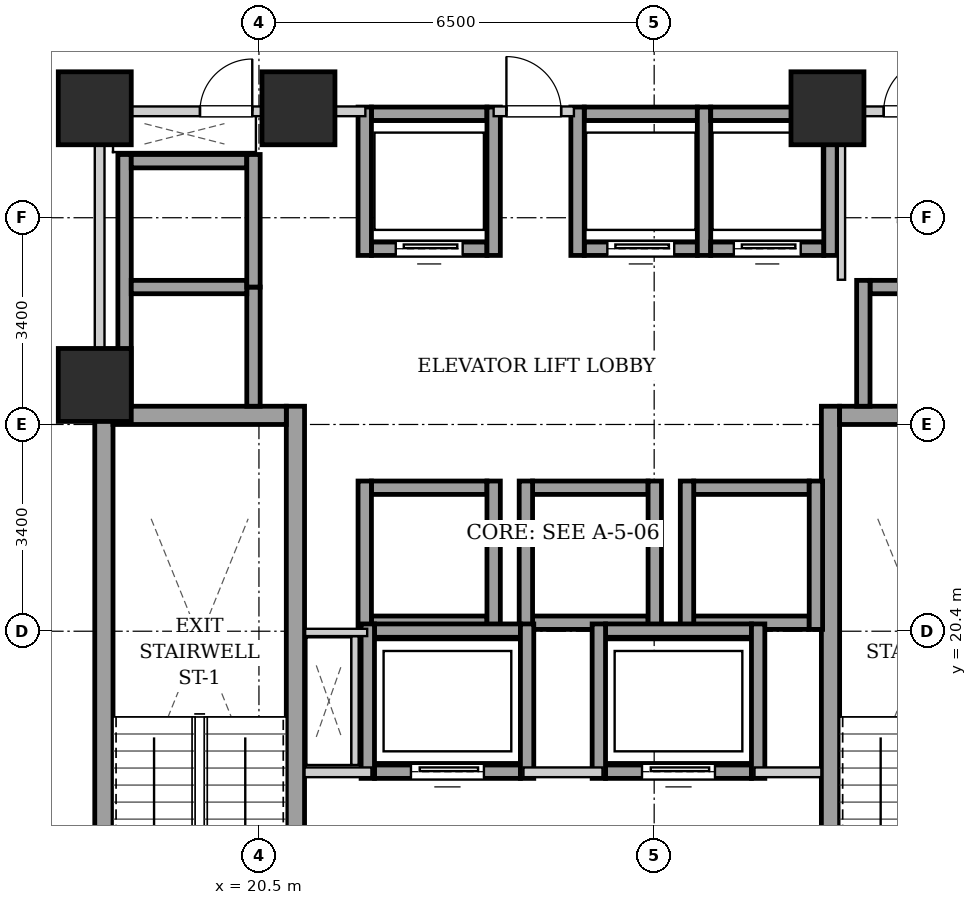
"""IFC4 building model, lengths in metres.
Left out: names, types, materials, properties, quantities, classifications, styles, units other than length and angle.
Written with IfcOpenShell. Run it as: python <this file> out.ifc"""

import sys

from ifc_helpers import new_model, si_unit, direction, frame, frame_2d, origin, origin_2d, place, context, subcontext, project, spatial, rectangle, extrude, element, fill, save


model = new_model("IFC4")
c1 = context("Model", 3, precision=1e-05, world=origin(), true_north=direction((0.0, 1.0)))
c2 = subcontext(c1, "Body", "Model", "MODEL_VIEW")
j1 = project(units=[si_unit("LENGTHUNIT", "METRE"), si_unit("PLANEANGLEUNIT", "RADIAN")], contexts=[c1])
p1 = place(None, origin())
s1 = spatial("IfcSite", under=j1, at=p1, CompositionType="ELEMENT")
p2 = place(p1, origin())
s2 = spatial("IfcBuilding", under=s1, at=p2, CompositionType="ELEMENT")
p3 = place(p2, frame((0.0, 0.0, 54.6)))
s3 = spatial("IfcBuildingStorey", under=s2, at=p3, CompositionType="ELEMENT", Elevation=54.6)
for number, where, z_axis, x_axis in (
    (1, (17.8, 29.0, 0.0), (0.0, 0.0, 1.0), (1.0, 0.0, 0.0)),
    (2, (21.15, 29.0, 0.0), (0.0, 0.0, 1.0), (1.0, 0.0, 0.0)),
    (3, (29.85, 29.0, 0.0), (0.0, 0.0, 1.0), (1.0, 0.0, 0.0)),
    (4, (17.8, 24.45, 0.0), (0.0, 0.0, 1.0), (1.0, 0.0, 0.0)),
):
    element("IfcColumn", number, at=place(p3, frame(where, z_axis=z_axis, x_axis=x_axis)), inside=s3, PredefinedType="COLUMN", context=c2, shape_type="SweptSolid", body=[
        extrude(rectangle(XDim=1.2, YDim=1.2, at=origin_2d()), origin(), (0.0, 0.0, 1.0), 3.2),
    ])
for number, where, z_axis, x_axis in (
    (5, (17.95, 15.1, 0.0), (0.0, 0.0, 1.0), (0.0, 1.0, 0.0)),
    (6, (21.1, 15.1, 0.0), (0.0, 0.0, 1.0), (0.0, 1.0, 0.0)),
):
    element("IfcWall", number, at=place(p3, frame(where, z_axis=z_axis, x_axis=x_axis)), inside=s3, PredefinedType="SHEAR", context=c2, shape_type="SweptSolid", body=[
        extrude(rectangle(XDim=9.0, YDim=0.3, at=frame_2d((4.5, 0.0))), origin(), (0.0, 0.0, 1.0), 2.94),
    ])
p4 = place(p3, frame((18.1, 23.95, 0.0), z_axis=(0.0, 0.0, 1.0), x_axis=(1.0, 0.0, 0.0)))
e7 = element("IfcWall", 7, at=p4, inside=s3, PredefinedType="SHEAR", context=c2, shape_type="SweptSolid", body=[
    extrude(rectangle(XDim=2.85, YDim=0.3, at=frame_2d((1.425, 0.0))), origin(), (0.0, 0.0, 1.0), 2.94),
])
p5 = place(p3, frame((29.9, 15.1, 0.0), z_axis=(0.0, 0.0, 1.0), x_axis=(0.0, 1.0, 0.0)))
e8 = element("IfcWall", 8, at=p5, inside=s3, PredefinedType="SHEAR", context=c2, shape_type="SweptSolid", body=[
    extrude(rectangle(XDim=9.0, YDim=0.3, at=frame_2d((4.5, 0.0))), origin(), (0.0, 0.0, 1.0), 2.94),
])
p6 = place(p3, frame((30.05, 23.95, 0.0), z_axis=(0.0, 0.0, 1.0), x_axis=(1.0, 0.0, 0.0)))
e9 = element("IfcWall", 9, at=p6, inside=s3, PredefinedType="SHEAR", context=c2, shape_type="SweptSolid", body=[
    extrude(rectangle(XDim=2.85, YDim=0.3, at=frame_2d((1.425, 0.0))), origin(), (0.0, 0.0, 1.0), 2.94),
])
p7 = place(p3, frame((22.35, 26.69, 0.0), z_axis=(0.0, 0.0, 1.0), x_axis=(1.0, 0.0, 0.0)))
e10 = element("IfcWall", 10, at=p7, inside=s3, PredefinedType="SHEAR", context=c2, shape_type="SweptSolid", body=[
    extrude(rectangle(XDim=1.9, YDim=0.22, at=frame_2d((0.95, 0.0))), origin(), (0.0, 0.0, 1.0), 2.94),
])
p8 = place(p7, frame((0.4, 0.0, 0.0)))
e11 = element("IfcOpeningElement", 11, at=p8, cuts=e10, PredefinedType="OPENING", context=c2, shape_type="SweptSolid", body=[
    extrude(rectangle(XDim=1.1, YDim=2.15, at=frame_2d((0.55, 1.075))), frame((0.0, 0.12, 0.0), z_axis=(0.0, -1.0, 0.0), x_axis=(1.0, 0.0, 0.0)), (0.0, 0.0, 1.0), 0.24),
])
p9 = place(p3, frame((22.35, 28.91, 0.0), z_axis=(0.0, 0.0, 1.0), x_axis=(1.0, 0.0, 0.0)))
e12 = element("IfcWall", 12, at=p9, inside=s3, PredefinedType="SHEAR", context=c2, shape_type="SweptSolid", body=[
    extrude(rectangle(XDim=1.9, YDim=0.22, at=frame_2d((0.95, 0.0))), origin(), (0.0, 0.0, 1.0), 2.94),
])
for number, where, z_axis, x_axis in (
    (13, (22.24, 26.58, 0.0), (0.0, 0.0, 1.0), (0.0, 1.0, 0.0)),
    (14, (24.36, 26.58, 0.0), (0.0, 0.0, 1.0), (0.0, 1.0, 0.0)),
):
    element("IfcWall", number, at=place(p3, frame(where, z_axis=z_axis, x_axis=x_axis)), inside=s3, PredefinedType="SHEAR", context=c2, shape_type="SweptSolid", body=[
        extrude(rectangle(XDim=2.44, YDim=0.22, at=frame_2d((1.22, 0.0))), origin(), (0.0, 0.0, 1.0), 2.94),
    ])
p10 = place(p3, frame((25.85, 26.69, 0.0), z_axis=(0.0, 0.0, 1.0), x_axis=(1.0, 0.0, 0.0)))
e15 = element("IfcWall", 15, at=p10, inside=s3, PredefinedType="SHEAR", context=c2, shape_type="SweptSolid", body=[
    extrude(rectangle(XDim=1.86, YDim=0.22, at=frame_2d((0.93, 0.0))), origin(), (0.0, 0.0, 1.0), 2.94),
])
p11 = place(p10, frame((0.38, 0.0, 0.0)))
e16 = element("IfcOpeningElement", 16, at=p11, cuts=e15, PredefinedType="OPENING", context=c2, shape_type="SweptSolid", body=[
    extrude(rectangle(XDim=1.1, YDim=2.15, at=frame_2d((0.55, 1.075))), frame((0.0, 0.12, 0.0), z_axis=(0.0, -1.0, 0.0), x_axis=(1.0, 0.0, 0.0)), (0.0, 0.0, 1.0), 0.24),
])
p12 = place(p3, frame((25.85, 28.91, 0.0), z_axis=(0.0, 0.0, 1.0), x_axis=(1.0, 0.0, 0.0)))
e17 = element("IfcWall", 17, at=p12, inside=s3, PredefinedType="SHEAR", context=c2, shape_type="SweptSolid", body=[
    extrude(rectangle(XDim=1.86, YDim=0.22, at=frame_2d((0.93, 0.0))), origin(), (0.0, 0.0, 1.0), 2.94),
])
for number, where, z_axis, x_axis in (
    (18, (25.74, 26.58, 0.0), (0.0, 0.0, 1.0), (0.0, 1.0, 0.0)),
    (19, (27.82, 26.58, 0.0), (0.0, 0.0, 1.0), (0.0, 1.0, 0.0)),
):
    element("IfcWall", number, at=place(p3, frame(where, z_axis=z_axis, x_axis=x_axis)), inside=s3, PredefinedType="SHEAR", context=c2, shape_type="SweptSolid", body=[
        extrude(rectangle(XDim=2.44, YDim=0.22, at=frame_2d((1.22, 0.0))), origin(), (0.0, 0.0, 1.0), 2.94),
    ])
p13 = place(p3, frame((27.93, 26.69, 0.0), z_axis=(0.0, 0.0, 1.0), x_axis=(1.0, 0.0, 0.0)))
e20 = element("IfcWall", 20, at=p13, inside=s3, PredefinedType="SHEAR", context=c2, shape_type="SweptSolid", body=[
    extrude(rectangle(XDim=1.86, YDim=0.22, at=frame_2d((0.93, 0.0))), origin(), (0.0, 0.0, 1.0), 2.94),
])
p14 = place(p13, frame((0.38, 0.0, 0.0)))
e21 = element("IfcOpeningElement", 21, at=p14, cuts=e20, PredefinedType="OPENING", context=c2, shape_type="SweptSolid", body=[
    extrude(rectangle(XDim=1.1, YDim=2.15, at=frame_2d((0.55, 1.075))), frame((0.0, 0.12, 0.0), z_axis=(0.0, -1.0, 0.0), x_axis=(1.0, 0.0, 0.0)), (0.0, 0.0, 1.0), 0.24),
])
p15 = place(p3, frame((27.93, 28.91, 0.0), z_axis=(0.0, 0.0, 1.0), x_axis=(1.0, 0.0, 0.0)))
e22 = element("IfcWall", 22, at=p15, inside=s3, PredefinedType="SHEAR", context=c2, shape_type="SweptSolid", body=[
    extrude(rectangle(XDim=1.86, YDim=0.22, at=frame_2d((0.93, 0.0))), origin(), (0.0, 0.0, 1.0), 2.94),
])
p16 = place(p3, frame((29.9, 26.58, 0.0), z_axis=(0.0, 0.0, 1.0), x_axis=(0.0, 1.0, 0.0)))
e23 = element("IfcWall", 23, at=p16, inside=s3, PredefinedType="SHEAR", context=c2, shape_type="SweptSolid", body=[
    extrude(rectangle(XDim=2.44, YDim=0.22, at=frame_2d((1.22, 0.0))), origin(), (0.0, 0.0, 1.0), 2.94),
])
for number, where, z_axis, x_axis in (
    (24, (22.35, 20.54, 0.0), (0.0, 0.0, 1.0), (1.0, 0.0, 0.0)),
    (25, (22.35, 22.76, 0.0), (0.0, 0.0, 1.0), (1.0, 0.0, 0.0)),
):
    element("IfcWall", number, at=place(p3, frame(where, z_axis=z_axis, x_axis=x_axis)), inside=s3, PredefinedType="SHEAR", context=c2, shape_type="SweptSolid", body=[
        extrude(rectangle(XDim=1.9, YDim=0.22, at=frame_2d((0.95, 0.0))), origin(), (0.0, 0.0, 1.0), 2.94),
    ])
for number, where, z_axis, x_axis in (
    (26, (22.24, 20.43, 0.0), (0.0, 0.0, 1.0), (0.0, 1.0, 0.0)),
    (27, (24.36, 20.43, 0.0), (0.0, 0.0, 1.0), (0.0, 1.0, 0.0)),
):
    element("IfcWall", number, at=place(p3, frame(where, z_axis=z_axis, x_axis=x_axis)), inside=s3, PredefinedType="SHEAR", context=c2, shape_type="SweptSolid", body=[
        extrude(rectangle(XDim=2.44, YDim=0.22, at=frame_2d((1.22, 0.0))), origin(), (0.0, 0.0, 1.0), 2.94),
    ])
for number, where, z_axis, x_axis in (
    (28, (25.0, 20.54, 0.0), (0.0, 0.0, 1.0), (1.0, 0.0, 0.0)),
    (29, (25.0, 22.76, 0.0), (0.0, 0.0, 1.0), (1.0, 0.0, 0.0)),
):
    element("IfcWall", number, at=place(p3, frame(where, z_axis=z_axis, x_axis=x_axis)), inside=s3, PredefinedType="SHEAR", context=c2, shape_type="SweptSolid", body=[
        extrude(rectangle(XDim=1.9, YDim=0.22, at=frame_2d((0.95, 0.0))), origin(), (0.0, 0.0, 1.0), 2.94),
    ])
for number, where, z_axis, x_axis in (
    (30, (24.89, 20.43, 0.0), (0.0, 0.0, 1.0), (0.0, 1.0, 0.0)),
    (31, (27.01, 20.43, 0.0), (0.0, 0.0, 1.0), (0.0, 1.0, 0.0)),
):
    element("IfcWall", number, at=place(p3, frame(where, z_axis=z_axis, x_axis=x_axis)), inside=s3, PredefinedType="SHEAR", context=c2, shape_type="SweptSolid", body=[
        extrude(rectangle(XDim=2.44, YDim=0.22, at=frame_2d((1.22, 0.0))), origin(), (0.0, 0.0, 1.0), 2.94),
    ])
for number, where, z_axis, x_axis in (
    (32, (27.65, 20.54, 0.0), (0.0, 0.0, 1.0), (1.0, 0.0, 0.0)),
    (33, (27.65, 22.76, 0.0), (0.0, 0.0, 1.0), (1.0, 0.0, 0.0)),
):
    element("IfcWall", number, at=place(p3, frame(where, z_axis=z_axis, x_axis=x_axis)), inside=s3, PredefinedType="SHEAR", context=c2, shape_type="SweptSolid", body=[
        extrude(rectangle(XDim=1.9, YDim=0.22, at=frame_2d((0.95, 0.0))), origin(), (0.0, 0.0, 1.0), 2.94),
    ])
for number, where, z_axis, x_axis in (
    (34, (27.54, 20.43, 0.0), (0.0, 0.0, 1.0), (0.0, 1.0, 0.0)),
    (35, (29.66, 20.43, 0.0), (0.0, 0.0, 1.0), (0.0, 1.0, 0.0)),
):
    element("IfcWall", number, at=place(p3, frame(where, z_axis=z_axis, x_axis=x_axis)), inside=s3, PredefinedType="SHEAR", context=c2, shape_type="SweptSolid", body=[
        extrude(rectangle(XDim=2.44, YDim=0.22, at=frame_2d((1.22, 0.0))), origin(), (0.0, 0.0, 1.0), 2.94),
    ])
p17 = place(p3, frame((18.29, 24.1, 0.0), z_axis=(0.0, 0.0, 1.0), x_axis=(0.0, 1.0, 0.0)))
e36 = element("IfcWall", 36, at=p17, inside=s3, PredefinedType="SHEAR", context=c2, shape_type="SweptSolid", body=[
    extrude(rectangle(XDim=4.14, YDim=0.22, at=frame_2d((2.07, 0.0))), origin(), (0.0, 0.0, 1.0), 2.94),
])
p18 = place(p3, frame((20.41, 24.1, 0.0), z_axis=(0.0, 0.0, 1.0), x_axis=(0.0, 1.0, 0.0)))
e37 = element("IfcWall", 37, at=p18, inside=s3, PredefinedType="SHEAR", context=c2, shape_type="SweptSolid", body=[
    extrude(rectangle(XDim=1.96, YDim=0.22, at=frame_2d((0.98, 0.0))), origin(), (0.0, 0.0, 1.0), 2.94),
])
for number, where, z_axis, x_axis in (
    (38, (18.4, 26.06, 0.0), (0.0, 0.0, 1.0), (1.0, 0.0, 0.0)),
    (39, (18.4, 28.13, 0.0), (0.0, 0.0, 1.0), (1.0, 0.0, 0.0)),
):
    element("IfcWall", number, at=place(p3, frame(where, z_axis=z_axis, x_axis=x_axis)), inside=s3, PredefinedType="SHEAR", context=c2, shape_type="SweptSolid", body=[
        extrude(rectangle(XDim=1.9, YDim=0.22, at=frame_2d((0.95, 0.0))), origin(), (0.0, 0.0, 1.0), 2.94),
    ])
p19 = place(p3, frame((20.41, 26.06, 0.0), z_axis=(0.0, 0.0, 1.0), x_axis=(0.0, 1.0, 0.0)))
e40 = element("IfcWall", 40, at=p19, inside=s3, PredefinedType="SHEAR", context=c2, shape_type="SweptSolid", body=[
    extrude(rectangle(XDim=2.18, YDim=0.22, at=frame_2d((1.09, 0.0))), origin(), (0.0, 0.0, 1.0), 2.94),
])
p20 = place(p3, frame((30.55, 26.06, 0.0), z_axis=(0.0, 0.0, 1.0), x_axis=(1.0, 0.0, 0.0)))
e41 = element("IfcWall", 41, at=p20, inside=s3, PredefinedType="SHEAR", context=c2, shape_type="SweptSolid", body=[
    extrude(rectangle(XDim=1.9, YDim=0.22, at=frame_2d((0.95, 0.0))), origin(), (0.0, 0.0, 1.0), 2.94),
])
p21 = place(p3, frame((30.44, 24.1, 0.0), z_axis=(0.0, 0.0, 1.0), x_axis=(0.0, 1.0, 0.0)))
e42 = element("IfcWall", 42, at=p21, inside=s3, PredefinedType="SHEAR", context=c2, shape_type="SweptSolid", body=[
    extrude(rectangle(XDim=2.07, YDim=0.22, at=frame_2d((1.035, 0.0))), origin(), (0.0, 0.0, 1.0), 2.94),
])
p22 = place(p3, frame((22.4, 18.09, 0.0), z_axis=(0.0, 0.0, 1.0), x_axis=(1.0, 0.0, 0.0)))
e43 = element("IfcWall", 43, at=p22, inside=s3, PredefinedType="SHEAR", context=c2, shape_type="SweptSolid", body=[
    extrude(rectangle(XDim=2.4, YDim=0.22, at=frame_2d((1.2, 0.0))), origin(), (0.0, 0.0, 1.0), 2.94),
])
p23 = place(p22, frame((0.6, 0.0, 0.0)))
e44 = element("IfcOpeningElement", 44, at=p23, cuts=e43, PredefinedType="OPENING", context=c2, shape_type="SweptSolid", body=[
    extrude(rectangle(XDim=1.2, YDim=2.15, at=frame_2d((0.6, 1.075))), frame((0.0, 0.12, 0.0), z_axis=(0.0, -1.0, 0.0), x_axis=(1.0, 0.0, 0.0)), (0.0, 0.0, 1.0), 0.24),
])
p24 = place(p3, frame((22.4, 20.41, 0.0), z_axis=(0.0, 0.0, 1.0), x_axis=(1.0, 0.0, 0.0)))
e45 = element("IfcWall", 45, at=p24, inside=s3, PredefinedType="SHEAR", context=c2, shape_type="SweptSolid", body=[
    extrude(rectangle(XDim=2.4, YDim=0.22, at=frame_2d((1.2, 0.0))), origin(), (0.0, 0.0, 1.0), 2.94),
])
for number, where, z_axis, x_axis in (
    (46, (22.29, 17.98, 0.0), (0.0, 0.0, 1.0), (0.0, 1.0, 0.0)),
    (47, (24.91, 17.98, 0.0), (0.0, 0.0, 1.0), (0.0, 1.0, 0.0)),
):
    element("IfcWall", number, at=place(p3, frame(where, z_axis=z_axis, x_axis=x_axis)), inside=s3, PredefinedType="SHEAR", context=c2, shape_type="SweptSolid", body=[
        extrude(rectangle(XDim=2.54, YDim=0.22, at=frame_2d((1.27, 0.0))), origin(), (0.0, 0.0, 1.0), 2.94),
    ])
p25 = place(p3, frame((26.2, 18.09, 0.0), z_axis=(0.0, 0.0, 1.0), x_axis=(1.0, 0.0, 0.0)))
e48 = element("IfcWall", 48, at=p25, inside=s3, PredefinedType="SHEAR", context=c2, shape_type="SweptSolid", body=[
    extrude(rectangle(XDim=2.4, YDim=0.22, at=frame_2d((1.2, 0.0))), origin(), (0.0, 0.0, 1.0), 2.94),
])
p26 = place(p25, frame((0.6, 0.0, 0.0)))
e49 = element("IfcOpeningElement", 49, at=p26, cuts=e48, PredefinedType="OPENING", context=c2, shape_type="SweptSolid", body=[
    extrude(rectangle(XDim=1.2, YDim=2.15, at=frame_2d((0.6, 1.075))), frame((0.0, 0.12, 0.0), z_axis=(0.0, -1.0, 0.0), x_axis=(1.0, 0.0, 0.0)), (0.0, 0.0, 1.0), 0.24),
])
p27 = place(p3, frame((26.2, 20.41, 0.0), z_axis=(0.0, 0.0, 1.0), x_axis=(1.0, 0.0, 0.0)))
e50 = element("IfcWall", 50, at=p27, inside=s3, PredefinedType="SHEAR", context=c2, shape_type="SweptSolid", body=[
    extrude(rectangle(XDim=2.4, YDim=0.22, at=frame_2d((1.2, 0.0))), origin(), (0.0, 0.0, 1.0), 2.94),
])
for number, where, z_axis, x_axis in (
    (51, (26.09, 17.98, 0.0), (0.0, 0.0, 1.0), (0.0, 1.0, 0.0)),
    (52, (28.71, 17.98, 0.0), (0.0, 0.0, 1.0), (0.0, 1.0, 0.0)),
):
    element("IfcWall", number, at=place(p3, frame(where, z_axis=z_axis, x_axis=x_axis)), inside=s3, PredefinedType="SHEAR", context=c2, shape_type="SweptSolid", body=[
        extrude(rectangle(XDim=2.54, YDim=0.22, at=frame_2d((1.27, 0.0))), origin(), (0.0, 0.0, 1.0), 2.94),
    ])
p28 = place(p3, frame((21.25, 18.08, 0.0), z_axis=(0.0, 0.0, 1.0), x_axis=(1.0, 0.0, 0.0)))
e53 = element("IfcWall", 53, at=p28, inside=s3, PredefinedType="PARTITIONING", context=c2, shape_type="SweptSolid", body=[
    extrude(rectangle(XDim=1.1, YDim=0.16, at=frame_2d((0.55, 0.0))), origin(), (0.0, 0.0, 1.0), 2.94),
])
p29 = place(p3, frame((24.85, 18.08, 0.0), z_axis=(0.0, 0.0, 1.0), x_axis=(1.0, 0.0, 0.0)))
e54 = element("IfcWall", 54, at=p29, inside=s3, PredefinedType="PARTITIONING", context=c2, shape_type="SweptSolid", body=[
    extrude(rectangle(XDim=1.3, YDim=0.16, at=frame_2d((0.65, 0.0))), origin(), (0.0, 0.0, 1.0), 2.94),
])
p30 = place(p3, frame((28.65, 18.08, 0.0), z_axis=(0.0, 0.0, 1.0), x_axis=(1.0, 0.0, 0.0)))
e55 = element("IfcWall", 55, at=p30, inside=s3, PredefinedType="PARTITIONING", context=c2, shape_type="SweptSolid", body=[
    extrude(rectangle(XDim=1.1, YDim=0.16, at=frame_2d((0.55, 0.0))), origin(), (0.0, 0.0, 1.0), 2.94),
])
p31 = place(p3, frame((17.88, 24.12, 0.0), z_axis=(0.0, 0.0, 1.0), x_axis=(0.0, 1.0, 0.0)))
e56 = element("IfcWall", 56, at=p31, inside=s3, PredefinedType="PARTITIONING", context=c2, shape_type="SweptSolid", body=[
    extrude(rectangle(XDim=4.76, YDim=0.16, at=frame_2d((2.38, 0.0))), origin(), (0.0, 0.0, 1.0), 2.94),
])
p32 = place(p3, frame((24.36, 28.95, 0.0), z_axis=(0.0, 0.0, 1.0), x_axis=(1.0, 0.0, 0.0)))
e57 = element("IfcWall", 57, at=p32, inside=s3, PredefinedType="PARTITIONING", context=c2, shape_type="SweptSolid", body=[
    extrude(rectangle(XDim=1.32, YDim=0.16, at=frame_2d((0.66, 0.0))), origin(), (0.0, 0.0, 1.0), 2.232),
])
p33 = place(p32, frame((0.21, 0.0, 0.0)))
e58 = element("IfcOpeningElement", 58, at=p33, cuts=e57, PredefinedType="OPENING", context=c2, shape_type="SweptSolid", body=[
    extrude(rectangle(XDim=0.9, YDim=2.05, at=frame_2d((0.45, 1.025))), frame((0.0, 0.09, 0.0), z_axis=(0.0, -1.0, 0.0), x_axis=(1.0, 0.0, 0.0)), (0.0, 0.0, 1.0), 0.18),
])
p34 = place(p3, frame((17.96, 28.95, 0.0), z_axis=(0.0, 0.0, 1.0), x_axis=(1.0, 0.0, 0.0)))
e59 = element("IfcWall", 59, at=p34, inside=s3, PredefinedType="PARTITIONING", context=c2, shape_type="SweptSolid", body=[
    extrude(rectangle(XDim=4.29, YDim=0.16, at=frame_2d((2.145, 0.0))), origin(), (0.0, 0.0, 1.0), 2.232),
])
p35 = place(p34, frame((1.57, 0.0, 0.0)))
e60 = element("IfcOpeningElement", 60, at=p35, cuts=e59, PredefinedType="OPENING", context=c2, shape_type="SweptSolid", body=[
    extrude(rectangle(XDim=0.86, YDim=2.05, at=frame_2d((0.43, 1.025))), frame((0.0, 0.09, 0.0), z_axis=(0.0, -1.0, 0.0), x_axis=(1.0, 0.0, 0.0)), (0.0, 0.0, 1.0), 0.18),
])
p36 = place(p3, frame((22.08, 18.2, 0.0), z_axis=(0.0, 0.0, 1.0), x_axis=(0.0, 1.0, 0.0)))
e61 = element("IfcWall", 61, at=p36, inside=s3, PredefinedType="PARTITIONING", context=c2, shape_type="SweptSolid", body=[
    extrude(rectangle(XDim=2.12, YDim=0.12, at=frame_2d((1.06, 0.0))), origin(), (0.0, 0.0, 1.0), 2.94),
])
p37 = place(p3, frame((22.28, 20.38, 0.0), z_axis=(0.0, 0.0, 1.0), x_axis=(-1.0, 0.0, 0.0)))
e62 = element("IfcWall", 62, at=p37, inside=s3, PredefinedType="PARTITIONING", context=c2, shape_type="SweptSolid", body=[
    extrude(rectangle(XDim=1.02, YDim=0.12, at=frame_2d((0.51, 0.0))), origin(), (0.0, 0.0, 1.0), 2.94),
])
p38 = place(p3, frame((30.08, 26.18, 0.0), z_axis=(0.0, 0.0, 1.0), x_axis=(0.0, 1.0, 0.0)))
e63 = element("IfcWall", 63, at=p38, inside=s3, PredefinedType="PARTITIONING", context=c2, shape_type="SweptSolid", body=[
    extrude(rectangle(XDim=2.68, YDim=0.12, at=frame_2d((1.34, 0.0))), origin(), (0.0, 0.0, 1.0), 2.94),
])
p39 = place(p3, frame((30.08, 28.95, 0.0), z_axis=(0.0, 0.0, 1.0), x_axis=(1.0, 0.0, 0.0)))
e64 = element("IfcWall", 64, at=p39, inside=s3, PredefinedType="PARTITIONING", context=c2, shape_type="SweptSolid", body=[
    extrude(rectangle(XDim=2.96, YDim=0.16, at=frame_2d((1.48, 0.0))), origin(), (0.0, 0.0, 1.0), 2.94),
])
p40 = place(p39, frame((0.695, 0.0, 0.0)))
e65 = element("IfcOpeningElement", 65, at=p40, cuts=e64, PredefinedType="OPENING", context=c2, shape_type="SweptSolid", body=[
    extrude(rectangle(XDim=0.86, YDim=2.05, at=frame_2d((0.43, 1.025))), frame((0.0, 0.09, 0.0), z_axis=(0.0, -1.0, 0.0), x_axis=(1.0, 0.0, 0.0)), (0.0, 0.0, 1.0), 0.18),
])
p41 = place(p8, origin())
e66 = element("IfcDoor", 66, at=p41, inside=s3, OperationType="SLIDING_TO_LEFT", PredefinedType="DOOR", context=c2, shape_type="SweptSolid", body=[
    extrude(rectangle(XDim=1.1, YDim=2.15, at=frame_2d((0.55, 1.075))), frame((0.0, 0.025, 0.0), z_axis=(0.0, -1.0, 0.0), x_axis=(1.0, 0.0, 0.0)), (0.0, 0.0, 1.0), 0.05),
])
fill(e11, e66)
p42 = place(p11, origin())
e67 = element("IfcDoor", 67, at=p42, inside=s3, OperationType="SLIDING_TO_LEFT", PredefinedType="DOOR", context=c2, shape_type="SweptSolid", body=[
    extrude(rectangle(XDim=1.1, YDim=2.15, at=frame_2d((0.55, 1.075))), frame((0.0, 0.025, 0.0), z_axis=(0.0, -1.0, 0.0), x_axis=(1.0, 0.0, 0.0)), (0.0, 0.0, 1.0), 0.05),
])
fill(e16, e67)
p43 = place(p14, origin())
e68 = element("IfcDoor", 68, at=p43, inside=s3, OperationType="SLIDING_TO_LEFT", PredefinedType="DOOR", context=c2, shape_type="SweptSolid", body=[
    extrude(rectangle(XDim=1.1, YDim=2.15, at=frame_2d((0.55, 1.075))), frame((0.0, 0.025, 0.0), z_axis=(0.0, -1.0, 0.0), x_axis=(1.0, 0.0, 0.0)), (0.0, 0.0, 1.0), 0.05),
])
fill(e21, e68)
p44 = place(p23, origin())
e69 = element("IfcDoor", 69, at=p44, inside=s3, OperationType="SLIDING_TO_LEFT", PredefinedType="DOOR", context=c2, shape_type="SweptSolid", body=[
    extrude(rectangle(XDim=1.2, YDim=2.15, at=frame_2d((0.6, 1.075))), frame((0.0, 0.025, 0.0), z_axis=(0.0, -1.0, 0.0), x_axis=(1.0, 0.0, 0.0)), (0.0, 0.0, 1.0), 0.05),
])
fill(e44, e69)
p45 = place(p26, origin())
e70 = element("IfcDoor", 70, at=p45, inside=s3, OperationType="SLIDING_TO_LEFT", PredefinedType="DOOR", context=c2, shape_type="SweptSolid", body=[
    extrude(rectangle(XDim=1.2, YDim=2.15, at=frame_2d((0.6, 1.075))), frame((0.0, 0.025, 0.0), z_axis=(0.0, -1.0, 0.0), x_axis=(1.0, 0.0, 0.0)), (0.0, 0.0, 1.0), 0.05),
])
fill(e49, e70)
p46 = place(p33, origin())
e71 = element("IfcDoor", 71, at=p46, inside=s3, OperationType="SINGLE_SWING_LEFT", PredefinedType="DOOR", context=c2, shape_type="SweptSolid", body=[
    extrude(rectangle(XDim=0.9, YDim=2.05, at=frame_2d((0.45, 1.025))), frame((0.0, 0.025, 0.0), z_axis=(0.0, -1.0, 0.0), x_axis=(1.0, 0.0, 0.0)), (0.0, 0.0, 1.0), 0.05),
])
fill(e58, e71)
p47 = place(p35, origin())
e72 = element("IfcDoor", 72, at=p47, inside=s3, OperationType="SINGLE_SWING_RIGHT", PredefinedType="DOOR", context=c2, shape_type="SweptSolid", body=[
    extrude(rectangle(XDim=0.86, YDim=2.05, at=frame_2d((0.43, 1.025))), frame((0.0, 0.025, 0.0), z_axis=(0.0, -1.0, 0.0), x_axis=(1.0, 0.0, 0.0)), (0.0, 0.0, 1.0), 0.05),
])
fill(e60, e72)
p48 = place(p40, origin())
e73 = element("IfcDoor", 73, at=p48, inside=s3, OperationType="SINGLE_SWING_RIGHT", PredefinedType="DOOR", context=c2, shape_type="SweptSolid", body=[
    extrude(rectangle(XDim=0.86, YDim=2.05, at=frame_2d((0.43, 1.025))), frame((0.0, 0.025, 0.0), z_axis=(0.0, -1.0, 0.0), x_axis=(1.0, 0.0, 0.0)), (0.0, 0.0, 1.0), 0.05),
])
fill(e65, e73)
save(model, sys.argv[1])
